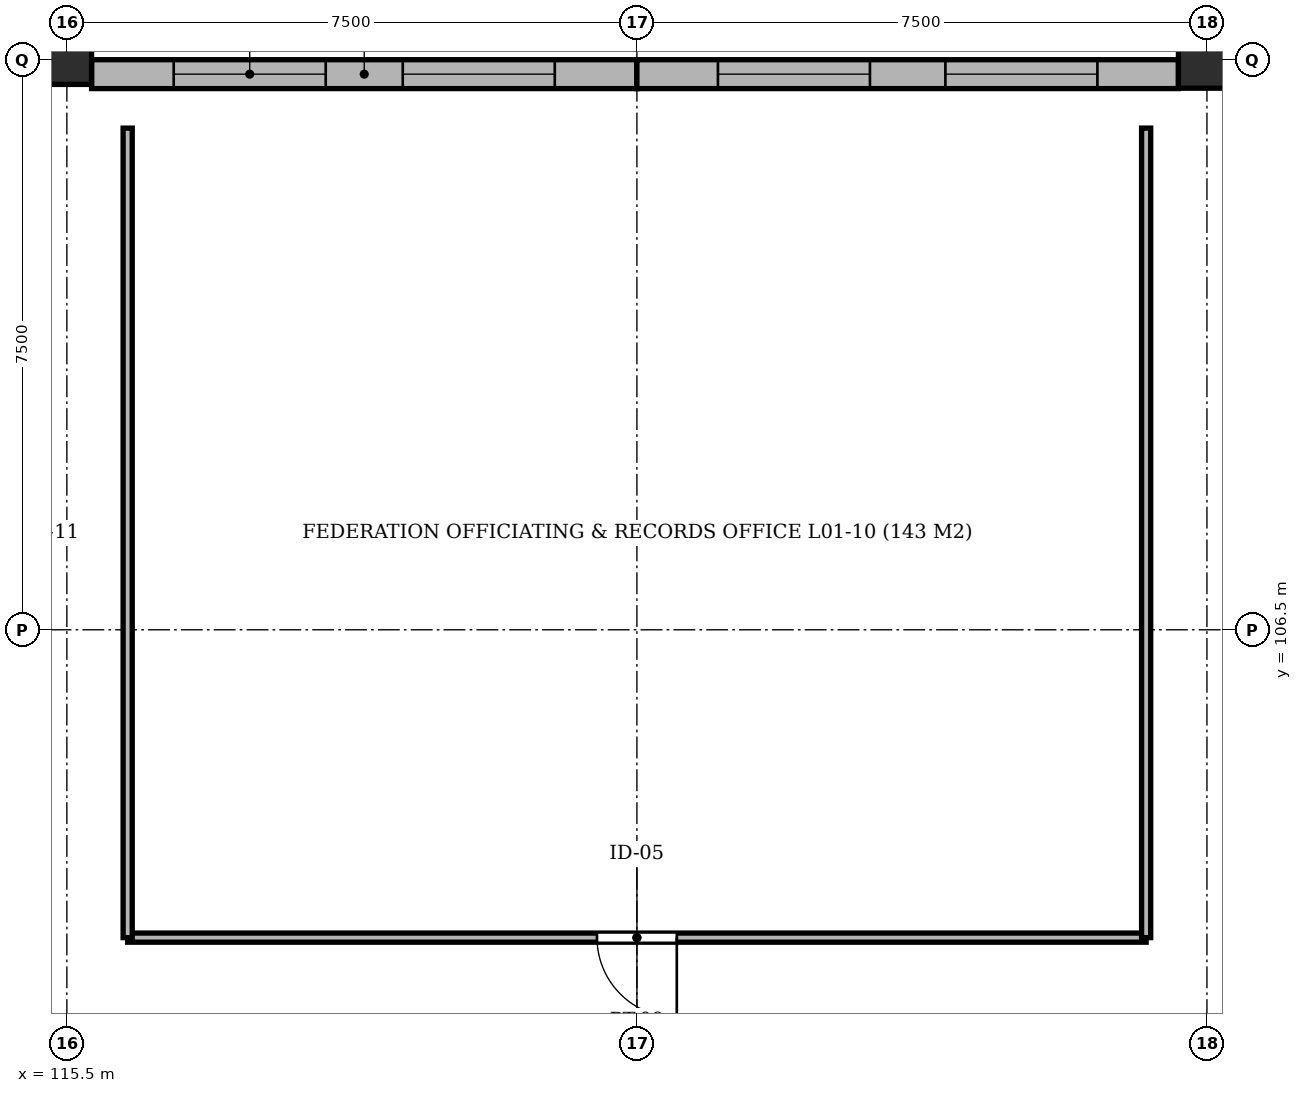
"""IFC4 building model, lengths in metres.
Left out: names, types, materials, properties, quantities, classifications, styles, units other than length and angle.
Written with IfcOpenShell. Run it as: python <this file> out.ifc"""

import sys

from ifc_helpers import new_model, si_unit, direction, frame, frame_2d, origin, origin_2d, place, context, subcontext, project, spatial, rectangle, extrude, element, fill, save


model = new_model("IFC4")
c1 = context("Model", 3, precision=1e-05, world=origin(), true_north=direction((0.0, 1.0)))
c2 = subcontext(c1, "Body", "Model", "MODEL_VIEW")
j1 = project(units=[si_unit("LENGTHUNIT", "METRE"), si_unit("PLANEANGLEUNIT", "RADIAN")], contexts=[c1])
p1 = place(None, origin())
s1 = spatial("IfcSite", under=j1, at=p1, CompositionType="ELEMENT")
p2 = place(p1, origin())
s2 = spatial("IfcBuilding", under=s1, at=p2, CompositionType="ELEMENT")
p3 = place(p2, frame((0.0, 0.0, 4.6)))
s3 = spatial("IfcBuildingStorey", under=s2, at=p3, CompositionType="ELEMENT", Elevation=4.6)
p4 = place(p3, frame((115.5, 114.0, -0.3), z_axis=(0.0, 0.0, 1.0), x_axis=(1.0, 0.0, 0.0)))
e1 = element("IfcColumn", 1, at=p4, inside=s3, PredefinedType="COLUMN", context=c2, shape_type="SweptSolid", body=[
    extrude(rectangle(XDim=0.65, YDim=0.65, at=origin_2d()), origin(), (0.0, 0.0, 1.0), 4.65),
])
p5 = place(p3, frame((130.5, 114.0, -0.3), z_axis=(0.0, 0.0, 1.0), x_axis=(1.0, 0.0, 0.0)))
e2 = element("IfcColumn", 2, at=p5, inside=s3, PredefinedType="COLUMN", context=c2, shape_type="SweptSolid", body=[
    extrude(rectangle(XDim=0.75, YDim=0.75, at=origin_2d()), origin(), (0.0, 0.0, 1.0), 4.65),
])
p6 = place(p3, frame((123.0, 113.81, 0.0), z_axis=(0.0, 0.0, 1.0), x_axis=(-1.0, 0.0, 0.0)))
e3 = element("IfcWall", 3, at=p6, inside=s3, PredefinedType="SOLIDWALL", context=c2, shape_type="SweptSolid", body=[
    extrude(rectangle(XDim=7.175, YDim=0.38, at=frame_2d((3.587, 0.0))), origin(), (0.0, 0.0, 1.0), 3.65),
])
p7 = place(p6, frame((4.094, 0.0, 0.92)))
e4 = element("IfcOpeningElement", 4, at=p7, cuts=e3, PredefinedType="OPENING", context=c2, shape_type="SweptSolid", body=[
    extrude(rectangle(XDim=2.0, YDim=2.3, at=frame_2d((1.0, 1.15))), frame((0.0, 0.202, 0.0), z_axis=(0.0, -1.0, 0.0), x_axis=(1.0, 0.0, 0.0)), (0.0, 0.0, 1.0), 0.404),
])
p8 = place(p6, frame((1.081, 0.0, 0.92)))
e5 = element("IfcOpeningElement", 5, at=p8, cuts=e3, PredefinedType="OPENING", context=c2, shape_type="SweptSolid", body=[
    extrude(rectangle(XDim=2.0, YDim=2.3, at=frame_2d((1.0, 1.15))), frame((0.0, 0.202, 0.0), z_axis=(0.0, -1.0, 0.0), x_axis=(1.0, 0.0, 0.0)), (0.0, 0.0, 1.0), 0.404),
])
p9 = place(p3, frame((130.125, 113.81, 0.0), z_axis=(0.0, 0.0, 1.0), x_axis=(-1.0, 0.0, 0.0)))
e6 = element("IfcWall", 6, at=p9, inside=s3, PredefinedType="SOLIDWALL", context=c2, shape_type="SweptSolid", body=[
    extrude(rectangle(XDim=7.125, YDim=0.38, at=frame_2d((3.562, 0.0))), origin(), (0.0, 0.0, 1.0), 3.65),
])
p10 = place(p9, frame((4.059, 0.0, 0.92)))
e7 = element("IfcOpeningElement", 7, at=p10, cuts=e6, PredefinedType="OPENING", context=c2, shape_type="SweptSolid", body=[
    extrude(rectangle(XDim=2.0, YDim=2.3, at=frame_2d((1.0, 1.15))), frame((0.0, 0.202, 0.0), z_axis=(0.0, -1.0, 0.0), x_axis=(1.0, 0.0, 0.0)), (0.0, 0.0, 1.0), 0.404),
])
p11 = place(p9, frame((1.066, 0.0, 0.92)))
e8 = element("IfcOpeningElement", 8, at=p11, cuts=e6, PredefinedType="OPENING", context=c2, shape_type="SweptSolid", body=[
    extrude(rectangle(XDim=2.0, YDim=2.3, at=frame_2d((1.0, 1.15))), frame((0.0, 0.202, 0.0), z_axis=(0.0, -1.0, 0.0), x_axis=(1.0, 0.0, 0.0)), (0.0, 0.0, 1.0), 0.404),
])
p12 = place(p3, frame((116.3, 102.45, 0.0), z_axis=(0.0, 0.0, 1.0), x_axis=(1.0, 0.0, 0.0)))
e9 = element("IfcWall", 9, at=p12, inside=s3, PredefinedType="PARTITIONING", context=c2, shape_type="SweptSolid", body=[
    extrude(rectangle(XDim=13.4, YDim=0.12, at=frame_2d((6.7, 0.0))), origin(), (0.0, 0.0, 1.0), 4.08),
])
p13 = place(p12, frame((6.175, 0.0, 0.0)))
e10 = element("IfcOpeningElement", 10, at=p13, cuts=e9, PredefinedType="OPENING", context=c2, shape_type="SweptSolid", body=[
    extrude(rectangle(XDim=1.05, YDim=2.15, at=frame_2d((0.525, 1.075))), frame((0.0, 0.072, 0.0), z_axis=(0.0, -1.0, 0.0), x_axis=(1.0, 0.0, 0.0)), (0.0, 0.0, 1.0), 0.144),
])
for number, where, z_axis, x_axis in (
    (11, (116.3, 102.45, 0.0), (0.0, 0.0, 1.0), (0.0, 1.0, 0.0)),
    (12, (129.7, 102.45, 0.0), (0.0, 0.0, 1.0), (0.0, 1.0, 0.0)),
):
    element("IfcWall", number, at=place(p3, frame(where, z_axis=z_axis, x_axis=x_axis)), inside=s3, PredefinedType="PARTITIONING", context=c2, shape_type="SweptSolid", body=[
        extrude(rectangle(XDim=10.65, YDim=0.12, at=frame_2d((5.325, 0.0))), origin(), (0.0, 0.0, 1.0), 4.08),
    ])
p14 = place(p7, origin())
e13 = element("IfcWindow", 13, at=p14, inside=s3, PartitioningType="SINGLE_PANEL", PredefinedType="WINDOW", context=c2, shape_type="SweptSolid", body=[
    extrude(rectangle(XDim=2.0, YDim=2.3, at=frame_2d((1.0, 1.15))), frame((0.0, 0.03, 0.0), z_axis=(0.0, -1.0, 0.0), x_axis=(1.0, 0.0, 0.0)), (0.0, 0.0, 1.0), 0.06),
])
fill(e4, e13)
p15 = place(p8, origin())
e14 = element("IfcWindow", 14, at=p15, inside=s3, PartitioningType="SINGLE_PANEL", PredefinedType="WINDOW", context=c2, shape_type="SweptSolid", body=[
    extrude(rectangle(XDim=2.0, YDim=2.3, at=frame_2d((1.0, 1.15))), frame((0.0, 0.03, 0.0), z_axis=(0.0, -1.0, 0.0), x_axis=(1.0, 0.0, 0.0)), (0.0, 0.0, 1.0), 0.06),
])
fill(e5, e14)
p16 = place(p10, origin())
e15 = element("IfcWindow", 15, at=p16, inside=s3, PartitioningType="SINGLE_PANEL", PredefinedType="WINDOW", context=c2, shape_type="SweptSolid", body=[
    extrude(rectangle(XDim=2.0, YDim=2.3, at=frame_2d((1.0, 1.15))), frame((0.0, 0.03, 0.0), z_axis=(0.0, -1.0, 0.0), x_axis=(1.0, 0.0, 0.0)), (0.0, 0.0, 1.0), 0.06),
])
fill(e7, e15)
p17 = place(p11, origin())
e16 = element("IfcWindow", 16, at=p17, inside=s3, PartitioningType="SINGLE_PANEL", PredefinedType="WINDOW", context=c2, shape_type="SweptSolid", body=[
    extrude(rectangle(XDim=2.0, YDim=2.3, at=frame_2d((1.0, 1.15))), frame((0.0, 0.03, 0.0), z_axis=(0.0, -1.0, 0.0), x_axis=(1.0, 0.0, 0.0)), (0.0, 0.0, 1.0), 0.06),
])
fill(e8, e16)
p18 = place(p13, frame((1.05, 0.0, 0.0), z_axis=(0.0, 0.0, 1.0), x_axis=(-1.0, 0.0, 0.0)))
e17 = element("IfcDoor", 17, at=p18, inside=s3, OperationType="SINGLE_SWING_RIGHT", PredefinedType="DOOR", context=c2, shape_type="SweptSolid", body=[
    extrude(rectangle(XDim=1.05, YDim=2.15, at=frame_2d((0.525, 1.075))), frame((0.0, 0.025, 0.0), z_axis=(0.0, -1.0, 0.0), x_axis=(1.0, 0.0, 0.0)), (0.0, 0.0, 1.0), 0.05),
])
fill(e10, e17)
save(model, sys.argv[1])
